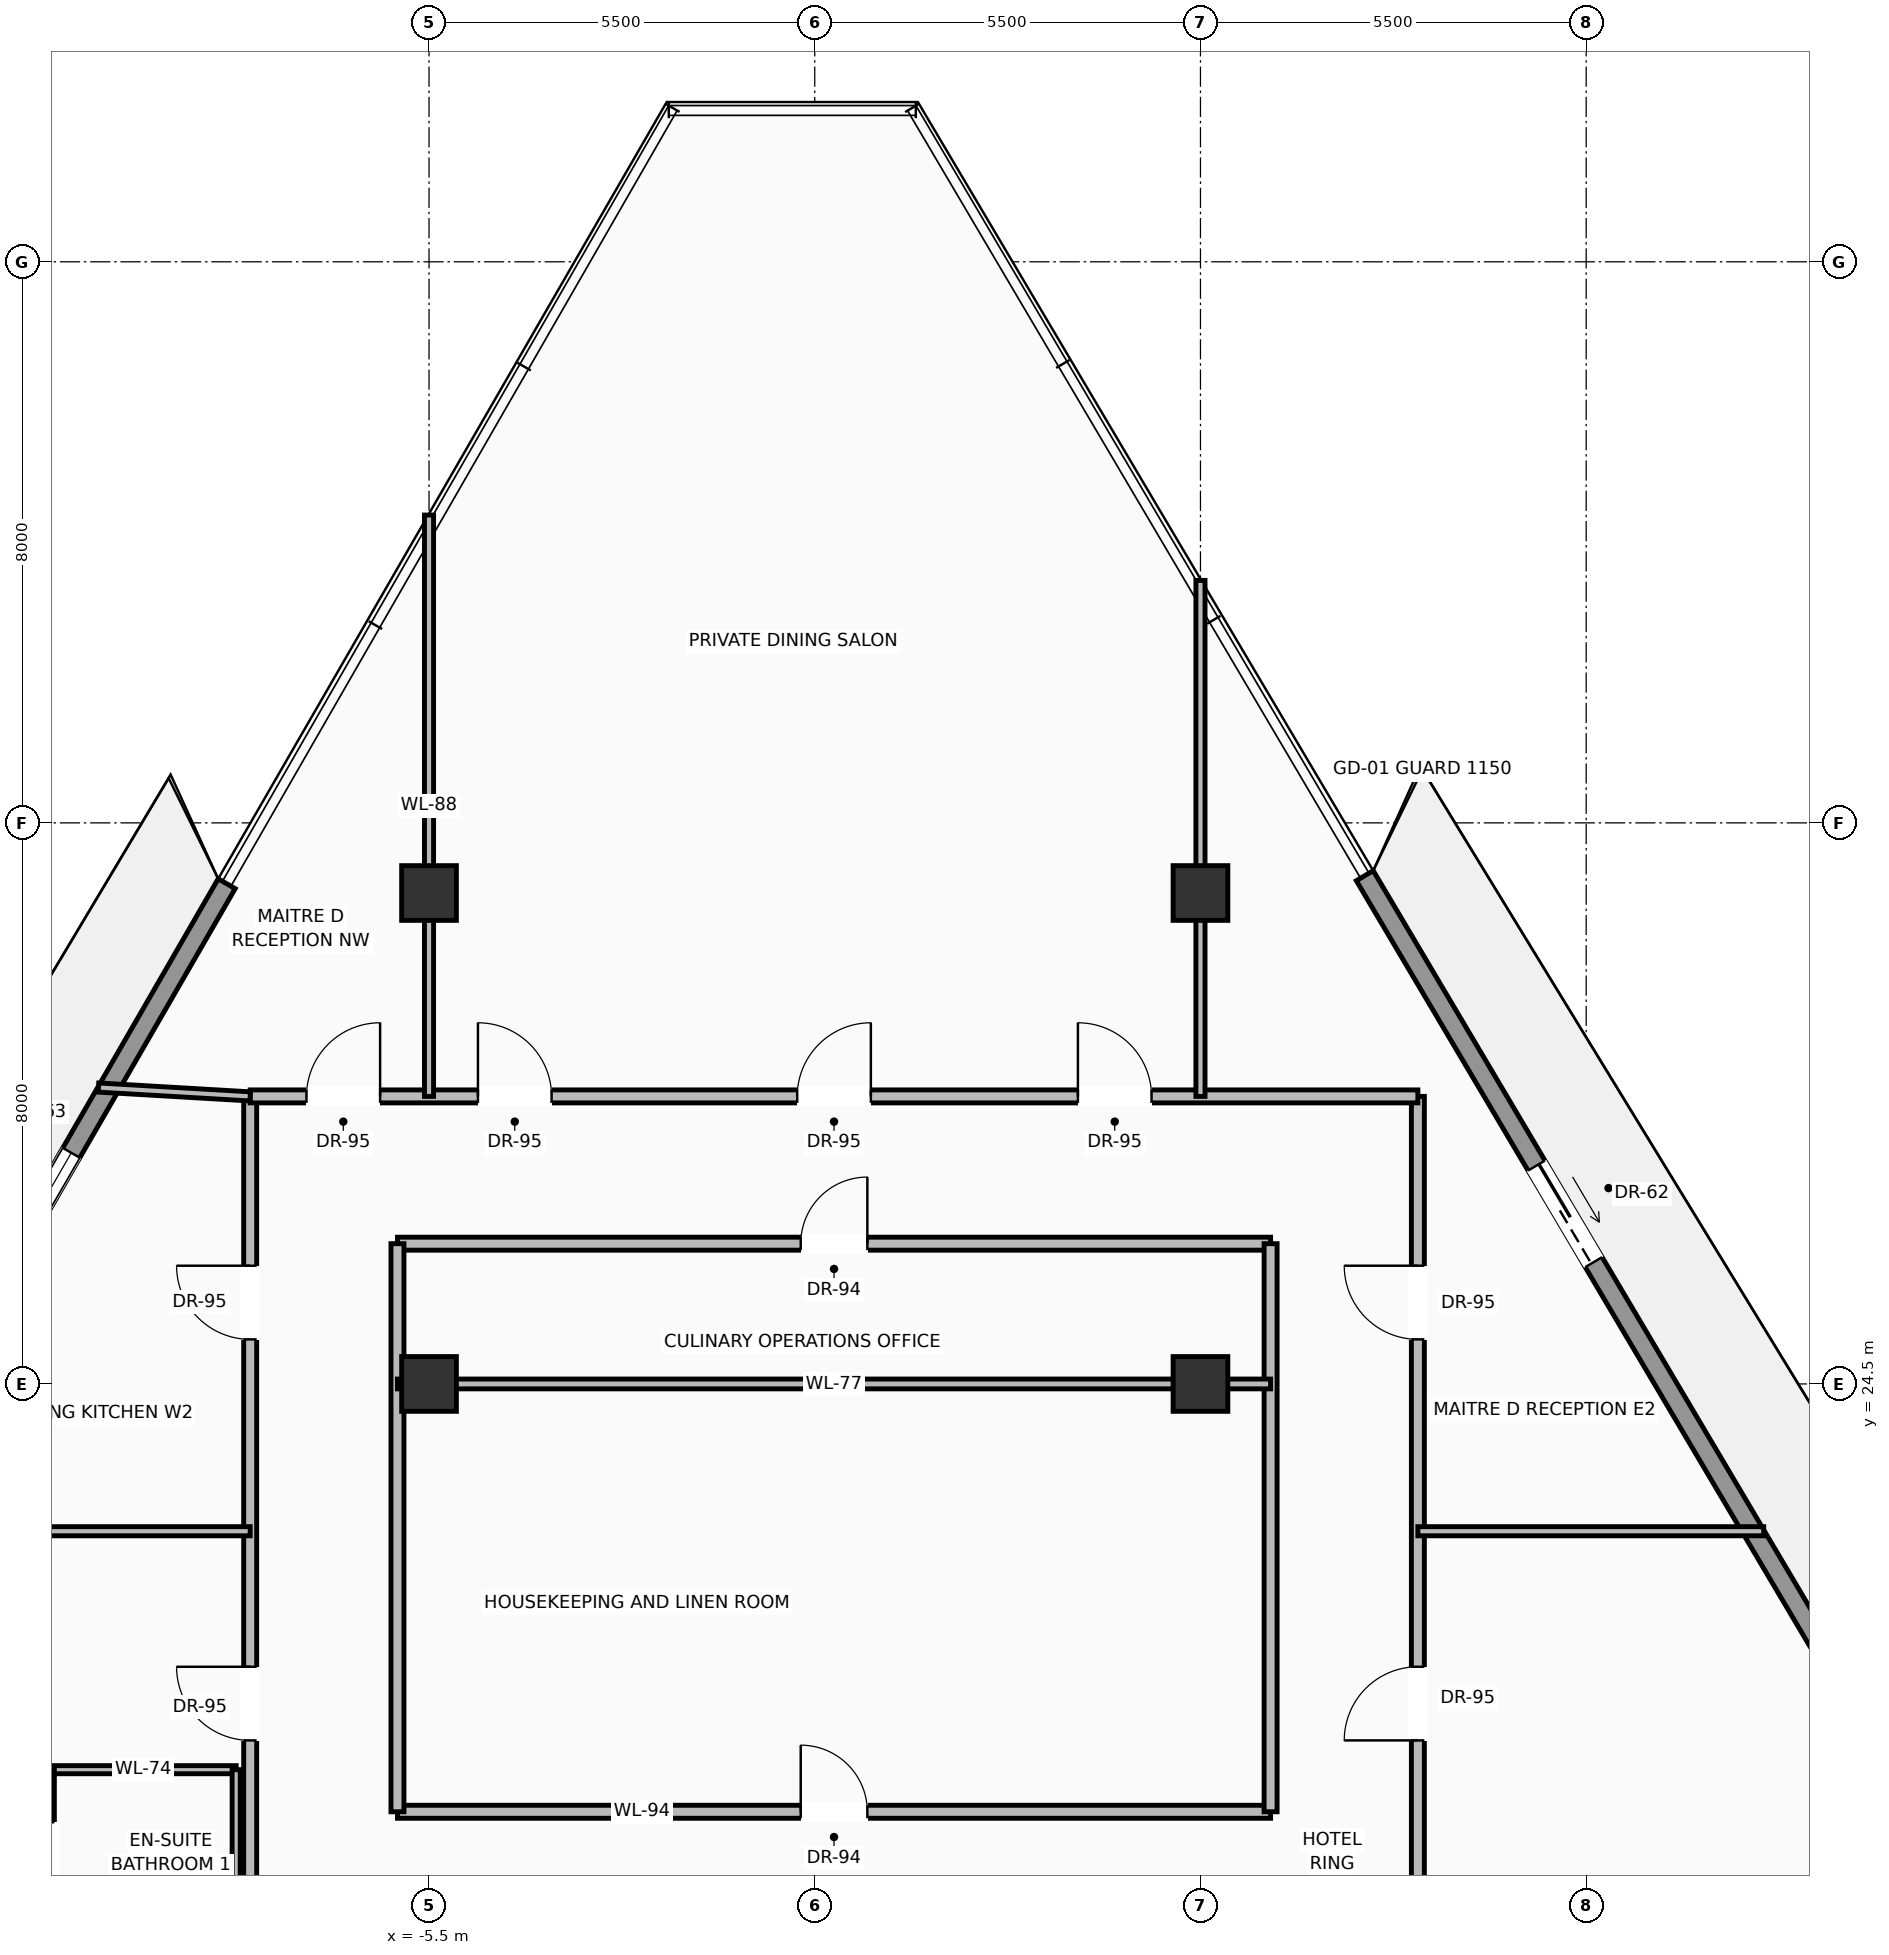
"""IFC4 building model, lengths in metres.
Left out: names, types, materials, properties, quantities, classifications, styles, units other than length and angle.
Written with IfcOpenShell. Run it as: python <this file> out.ifc"""

import sys

from ifc_helpers import new_model, si_unit, direction, frame, frame_2d, origin, origin_2d, place, context, subcontext, project, spatial, rectangle, extrude, source, transform, mapped, element, fill, save


model = new_model("IFC4")
c1 = context("Model", 3, precision=1e-05, world=origin(), true_north=direction((0.0, 1.0)))
c2 = subcontext(c1, "Body", "Model", "MODEL_VIEW")
j1 = project(units=[si_unit("LENGTHUNIT", "METRE"), si_unit("PLANEANGLEUNIT", "RADIAN")], contexts=[c1])
p1 = place(None, origin())
s1 = spatial("IfcSite", under=j1, at=p1, CompositionType="ELEMENT")
p2 = place(p1, origin())
s2 = spatial("IfcBuilding", under=s1, at=p2, CompositionType="ELEMENT")
p3 = place(p2, frame((0.0, 0.0, 276.45)))
s3 = spatial("IfcBuildingStorey", under=s2, at=p3, CompositionType="ELEMENT", Elevation=276.45)
m1 = source(origin(), c2, "Body", "SweptSolid", [
    extrude(rectangle(XDim=0.78, YDim=0.78, at=origin_2d()), origin(), (0.0, 0.0, 1.0), 3.45),
])
for number, where, z_axis, x_axis in (
    (1, (-5.5, 24.5, 0.0), (0.0, 0.0, 1.0), (1.0, 0.0, 0.0)),
    (2, (5.5, 24.5, 0.0), (0.0, 0.0, 1.0), (1.0, 0.0, 0.0)),
    (3, (-5.5, 31.5, 0.0), (0.0, 0.0, 1.0), (1.0, 0.0, 0.0)),
    (4, (5.5, 31.5, 0.0), (0.0, 0.0, 1.0), (1.0, 0.0, 0.0)),
):
    element("IfcColumn", number, at=place(p3, frame(where, z_axis=z_axis, x_axis=x_axis)), inside=s3, PredefinedType="COLUMN", context=c2, shape_type="MappedRepresentation", body=[
        mapped(m1, transform((0.0, 0.0, 0.0), scale=1.0)),
    ])
p4 = place(p3, frame((-18.435, 14.229, 0.0), z_axis=(0.0, 0.0, 1.0), x_axis=(0.50006385546, 0.865988533678, 0.0)))
e5 = element("IfcWall", 5, at=p4, inside=s3, PredefinedType="SOLIDWALL", context=c2, shape_type="SweptSolid", body=[
    extrude(rectangle(XDim=20.097, YDim=0.28, at=frame_2d((10.048, 0.0))), origin(), (0.0, 0.0, 1.0), 2.82),
])
p5 = place(p4, frame((4.823, 0.0, 0.0)))
e6 = element("IfcOpeningElement", 6, at=p5, cuts=e5, PredefinedType="OPENING", context=c2, shape_type="SweptSolid", body=[
    extrude(rectangle(XDim=1.6, YDim=2.35, at=frame_2d((0.8, 1.175))), frame((0.0, 0.15, 0.0), z_axis=(0.0, -1.0, 0.0), x_axis=(1.0, 0.0, 0.0)), (0.0, 0.0, 1.0), 0.3),
])
p6 = place(p4, frame((13.666, 0.0, 0.9)))
e7 = element("IfcOpeningElement", 7, at=p6, cuts=e5, PredefinedType="OPENING", context=c2, shape_type="SweptSolid", body=[
    extrude(rectangle(XDim=2.0, YDim=1.75, at=frame_2d((1.0, 0.875))), frame((0.0, 0.15, 0.0), z_axis=(0.0, -1.0, 0.0), x_axis=(1.0, 0.0, 0.0)), (0.0, 0.0, 1.0), 0.3),
])
p7 = place(p3, frame((7.843, 31.747, 0.0), z_axis=(0.0, 0.0, 1.0), x_axis=(0.50967367276, -0.860367797686, 0.0)))
e8 = element("IfcWall", 8, at=p7, inside=s3, PredefinedType="SOLIDWALL", context=c2, shape_type="SweptSolid", body=[
    extrude(rectangle(XDim=20.018, YDim=0.28, at=frame_2d((10.009, 0.0))), origin(), (0.0, 0.0, 1.0), 2.82),
])
p8 = place(p7, frame((4.804, 0.0, 0.0)))
e9 = element("IfcOpeningElement", 9, at=p8, cuts=e8, PredefinedType="OPENING", context=c2, shape_type="SweptSolid", body=[
    extrude(rectangle(XDim=1.6, YDim=2.35, at=frame_2d((0.8, 1.175))), frame((0.0, 0.15, 0.0), z_axis=(0.0, -1.0, 0.0), x_axis=(1.0, 0.0, 0.0)), (0.0, 0.0, 1.0), 0.3),
])
p9 = place(p7, frame((13.612, 0.0, 0.9)))
e10 = element("IfcOpeningElement", 10, at=p9, cuts=e8, PredefinedType="OPENING", context=c2, shape_type="SweptSolid", body=[
    extrude(rectangle(XDim=2.0, YDim=1.75, at=frame_2d((1.0, 0.875))), frame((0.0, 0.15, 0.0), z_axis=(0.0, -1.0, 0.0), x_axis=(1.0, 0.0, 0.0)), (0.0, 0.0, 1.0), 0.3),
])
p10 = place(p3, frame((-5.95, 18.4, 0.0), z_axis=(0.0, 0.0, 1.0), x_axis=(1.0, 0.0, 0.0)))
e11 = element("IfcWall", 11, at=p10, inside=s3, PredefinedType="PARTITIONING", context=c2, shape_type="SweptSolid", body=[
    extrude(rectangle(XDim=12.45, YDim=0.185, at=frame_2d((6.225, 0.0))), origin(), (0.0, 0.0, 1.0), 3.232),
])
p11 = place(p10, frame((5.75, 0.0, 0.0)))
e12 = element("IfcOpeningElement", 12, at=p11, cuts=e11, PredefinedType="OPENING", context=c2, shape_type="SweptSolid", body=[
    extrude(rectangle(XDim=0.95, YDim=2.2, at=frame_2d((0.475, 1.1))), frame((0.0, 0.103, 0.0), z_axis=(0.0, -1.0, 0.0), x_axis=(1.0, 0.0, 0.0)), (0.0, 0.0, 1.0), 0.205),
])
p12 = place(p3, frame((-5.95, 26.5, 0.0), z_axis=(0.0, 0.0, 1.0), x_axis=(1.0, 0.0, 0.0)))
e13 = element("IfcWall", 13, at=p12, inside=s3, PredefinedType="PARTITIONING", context=c2, shape_type="SweptSolid", body=[
    extrude(rectangle(XDim=12.45, YDim=0.185, at=frame_2d((6.225, 0.0))), origin(), (0.0, 0.0, 1.0), 3.232),
])
p13 = place(p12, frame((5.75, 0.0, 0.0)))
e14 = element("IfcOpeningElement", 14, at=p13, cuts=e13, PredefinedType="OPENING", context=c2, shape_type="SweptSolid", body=[
    extrude(rectangle(XDim=0.95, YDim=2.2, at=frame_2d((0.475, 1.1))), frame((0.0, 0.103, 0.0), z_axis=(0.0, -1.0, 0.0), x_axis=(1.0, 0.0, 0.0)), (0.0, 0.0, 1.0), 0.205),
])
for number, where, z_axis, x_axis in (
    (15, (-5.95, 18.4, 0.0), (0.0, 0.0, 1.0), (0.0, 1.0, 0.0)),
    (16, (6.5, 18.4, 0.0), (0.0, 0.0, 1.0), (0.0, 1.0, 0.0)),
):
    element("IfcWall", number, at=place(p3, frame(where, z_axis=z_axis, x_axis=x_axis)), inside=s3, PredefinedType="PARTITIONING", context=c2, shape_type="SweptSolid", body=[
        extrude(rectangle(XDim=8.1, YDim=0.185, at=frame_2d((4.05, 0.0))), origin(), (0.0, 0.0, 1.0), 3.232),
    ])
p14 = place(p3, frame((-8.05, 16.2, 0.0), z_axis=(0.0, 0.0, 1.0), x_axis=(0.0, 1.0, 0.0)))
e17 = element("IfcWall", 17, at=p14, inside=s3, PredefinedType="PARTITIONING", context=c2, shape_type="SweptSolid", body=[
    extrude(rectangle(XDim=12.4, YDim=0.185, at=frame_2d((6.2, 0.0))), origin(), (0.0, 0.0, 1.0), 3.232),
])
p15 = place(p14, frame((3.218, 0.0, 0.0)))
e18 = element("IfcOpeningElement", 18, at=p15, cuts=e17, PredefinedType="OPENING", context=c2, shape_type="SweptSolid", body=[
    extrude(rectangle(XDim=1.05, YDim=2.25, at=frame_2d((0.525, 1.125))), frame((0.0, 0.103, 0.0), z_axis=(0.0, -1.0, 0.0), x_axis=(1.0, 0.0, 0.0)), (0.0, 0.0, 1.0), 0.205),
])
p16 = place(p14, frame((8.936, 0.0, 0.0)))
e19 = element("IfcOpeningElement", 19, at=p16, cuts=e17, PredefinedType="OPENING", context=c2, shape_type="SweptSolid", body=[
    extrude(rectangle(XDim=1.05, YDim=2.25, at=frame_2d((0.525, 1.125))), frame((0.0, 0.103, 0.0), z_axis=(0.0, -1.0, 0.0), x_axis=(1.0, 0.0, 0.0)), (0.0, 0.0, 1.0), 0.205),
])
p17 = place(p3, frame((8.6, 16.2, 0.0), z_axis=(0.0, 0.0, 1.0), x_axis=(0.0, 1.0, 0.0)))
e20 = element("IfcWall", 20, at=p17, inside=s3, PredefinedType="PARTITIONING", context=c2, shape_type="SweptSolid", body=[
    extrude(rectangle(XDim=12.4, YDim=0.185, at=frame_2d((6.2, 0.0))), origin(), (0.0, 0.0, 1.0), 3.232),
])
p18 = place(p17, frame((3.218, 0.0, 0.0)))
e21 = element("IfcOpeningElement", 21, at=p18, cuts=e20, PredefinedType="OPENING", context=c2, shape_type="SweptSolid", body=[
    extrude(rectangle(XDim=1.05, YDim=2.25, at=frame_2d((0.525, 1.125))), frame((0.0, 0.103, 0.0), z_axis=(0.0, -1.0, 0.0), x_axis=(1.0, 0.0, 0.0)), (0.0, 0.0, 1.0), 0.205),
])
p19 = place(p17, frame((8.936, 0.0, 0.0)))
e22 = element("IfcOpeningElement", 22, at=p19, cuts=e20, PredefinedType="OPENING", context=c2, shape_type="SweptSolid", body=[
    extrude(rectangle(XDim=1.05, YDim=2.25, at=frame_2d((0.525, 1.125))), frame((0.0, 0.103, 0.0), z_axis=(0.0, -1.0, 0.0), x_axis=(1.0, 0.0, 0.0)), (0.0, 0.0, 1.0), 0.205),
])
p20 = place(p3, frame((-8.05, 28.6, 0.0), z_axis=(0.0, 0.0, 1.0), x_axis=(1.0, 0.0, 0.0)))
e23 = element("IfcWall", 23, at=p20, inside=s3, PredefinedType="PARTITIONING", context=c2, shape_type="SweptSolid", body=[
    extrude(rectangle(XDim=16.65, YDim=0.185, at=frame_2d((8.325, 0.0))), origin(), (0.0, 0.0, 1.0), 3.232),
])
p21 = place(p20, frame((3.248, 0.0, 0.0)))
e24 = element("IfcOpeningElement", 24, at=p21, cuts=e23, PredefinedType="OPENING", context=c2, shape_type="SweptSolid", body=[
    extrude(rectangle(XDim=1.05, YDim=2.25, at=frame_2d((0.525, 1.125))), frame((0.0, 0.103, 0.0), z_axis=(0.0, -1.0, 0.0), x_axis=(1.0, 0.0, 0.0)), (0.0, 0.0, 1.0), 0.205),
])
p22 = place(p20, frame((7.8, 0.0, 0.0)))
e25 = element("IfcOpeningElement", 25, at=p22, cuts=e23, PredefinedType="OPENING", context=c2, shape_type="SweptSolid", body=[
    extrude(rectangle(XDim=1.05, YDim=2.25, at=frame_2d((0.525, 1.125))), frame((0.0, 0.103, 0.0), z_axis=(0.0, -1.0, 0.0), x_axis=(1.0, 0.0, 0.0)), (0.0, 0.0, 1.0), 0.205),
])
p23 = place(p20, frame((11.802, 0.0, 0.0)))
e26 = element("IfcOpeningElement", 26, at=p23, cuts=e23, PredefinedType="OPENING", context=c2, shape_type="SweptSolid", body=[
    extrude(rectangle(XDim=1.05, YDim=2.25, at=frame_2d((0.525, 1.125))), frame((0.0, 0.103, 0.0), z_axis=(0.0, -1.0, 0.0), x_axis=(1.0, 0.0, 0.0)), (0.0, 0.0, 1.0), 0.205),
])
p24 = place(p20, frame((0.802, 0.0, 0.0)))
e27 = element("IfcOpeningElement", 27, at=p24, cuts=e23, PredefinedType="OPENING", context=c2, shape_type="SweptSolid", body=[
    extrude(rectangle(XDim=1.05, YDim=2.25, at=frame_2d((0.525, 1.125))), frame((0.0, 0.103, 0.0), z_axis=(0.0, -1.0, 0.0), x_axis=(1.0, 0.0, 0.0)), (0.0, 0.0, 1.0), 0.205),
])
p25 = place(p3, frame((-5.95, 24.5, 0.0), z_axis=(0.0, 0.0, 1.0), x_axis=(1.0, 0.0, 0.0)))
e28 = element("IfcWall", 28, at=p25, inside=s3, PredefinedType="PARTITIONING", context=c2, shape_type="SweptSolid", body=[
    extrude(rectangle(XDim=12.45, YDim=0.14, at=frame_2d((6.225, 0.0))), origin(), (0.0, 0.0, 1.0), 2.683),
])
p26 = place(p3, frame((-10.213, 28.726, 0.0), z_axis=(0.0, 0.0, 1.0), x_axis=(0.998302231297, -0.058246501928, 0.0)))
e29 = element("IfcWall", 29, at=p26, inside=s3, PredefinedType="PARTITIONING", context=c2, shape_type="SweptSolid", body=[
    extrude(rectangle(XDim=2.167, YDim=0.13, at=frame_2d((1.083, 0.0))), origin(), (0.0, 0.0, 1.0), 3.232),
])
p27 = place(p3, frame((-5.5, 28.6, 0.0), z_axis=(0.0, 0.0, 1.0), x_axis=(0.0, 1.0, 0.0)))
e30 = element("IfcWall", 30, at=p27, inside=s3, PredefinedType="PARTITIONING", context=c2, shape_type="SweptSolid", body=[
    extrude(rectangle(XDim=8.289, YDim=0.13, at=frame_2d((4.145, 0.0))), origin(), (0.0, 0.0, 1.0), 2.683),
])
p28 = place(p3, frame((5.5, 28.6, 0.0), z_axis=(0.0, 0.0, 1.0), x_axis=(0.0, 1.0, 0.0)))
e31 = element("IfcWall", 31, at=p28, inside=s3, PredefinedType="PARTITIONING", context=c2, shape_type="SweptSolid", body=[
    extrude(rectangle(XDim=7.357, YDim=0.13, at=frame_2d((3.679, 0.0))), origin(), (0.0, 0.0, 1.0), 2.683),
])
p29 = place(p3, frame((-10.9, 19.0, 0.0), z_axis=(0.0, 0.0, 1.0), x_axis=(1.0, 0.0, 0.0)))
e32 = element("IfcWall", 32, at=p29, inside=s3, PredefinedType="PARTITIONING", context=c2, shape_type="SweptSolid", body=[
    extrude(rectangle(XDim=2.65, YDim=0.115, at=frame_2d((1.325, 0.0))), origin(), (0.0, 0.0, 1.0), 3.232),
])
p30 = place(p3, frame((-10.9, 16.6, 0.0), z_axis=(0.0, 0.0, 1.0), x_axis=(0.0, 1.0, 0.0)))
e33 = element("IfcWall", 33, at=p30, inside=s3, PredefinedType="PARTITIONING", context=c2, shape_type="SweptSolid", body=[
    extrude(rectangle(XDim=2.4, YDim=0.115, at=frame_2d((1.2, 0.0))), origin(), (0.0, 0.0, 1.0), 3.232),
])
p31 = place(p30, frame((0.75, 0.0, 0.0)))
e34 = element("IfcOpeningElement", 34, at=p31, cuts=e33, PredefinedType="OPENING", context=c2, shape_type="SweptSolid", body=[
    extrude(rectangle(XDim=0.9, YDim=2.15, at=frame_2d((0.45, 1.075))), frame((0.0, 0.067, 0.0), z_axis=(0.0, -1.0, 0.0), x_axis=(1.0, 0.0, 0.0)), (0.0, 0.0, 1.0), 0.135),
])
p32 = place(p3, frame((-8.25, 16.6, 0.0), z_axis=(0.0, 0.0, 1.0), x_axis=(0.0, 1.0, 0.0)))
e35 = element("IfcWall", 35, at=p32, inside=s3, PredefinedType="PARTITIONING", context=c2, shape_type="SweptSolid", body=[
    extrude(rectangle(XDim=2.4, YDim=0.115, at=frame_2d((1.2, 0.0))), origin(), (0.0, 0.0, 1.0), 3.232),
])
p33 = place(p3, frame((-13.866, 22.4, 0.0), z_axis=(0.0, 0.0, 1.0), x_axis=(1.0, 0.0, 0.0)))
e36 = element("IfcWall", 36, at=p33, inside=s3, PredefinedType="PARTITIONING", context=c2, shape_type="SweptSolid", body=[
    extrude(rectangle(XDim=5.816, YDim=0.13, at=frame_2d((2.908, 0.0))), origin(), (0.0, 0.0, 1.0), 3.232),
])
p34 = place(p3, frame((8.6, 22.4, 0.0), z_axis=(0.0, 0.0, 1.0), x_axis=(1.0, 0.0, 0.0)))
e37 = element("IfcWall", 37, at=p34, inside=s3, PredefinedType="PARTITIONING", context=c2, shape_type="SweptSolid", body=[
    extrude(rectangle(XDim=4.931, YDim=0.13, at=frame_2d((2.466, 0.0))), origin(), (0.0, 0.0, 1.0), 3.232),
])
m2 = source(origin(), c2, "Body", "SweptSolid", [
    extrude(rectangle(XDim=2.0, YDim=1.75, at=frame_2d((1.0, 0.875))), frame((0.0, 0.03, 0.0), z_axis=(0.0, -1.0, 0.0), x_axis=(1.0, 0.0, 0.0)), (0.0, 0.0, 1.0), 0.06),
])
p35 = place(p6, origin())
e38 = element("IfcWindow", 38, at=p35, inside=s3, PartitioningType="SINGLE_PANEL", PredefinedType="WINDOW", context=c2, shape_type="MappedRepresentation", body=[
    mapped(m2, transform((0.0, 0.0, 0.0), scale=1.0)),
])
fill(e7, e38)
m3 = source(origin(), c2, "Body", "SweptSolid", [
    extrude(rectangle(XDim=1.6, YDim=2.35, at=frame_2d((0.8, 1.175))), frame((0.0, 0.025, 0.0), z_axis=(0.0, -1.0, 0.0), x_axis=(1.0, 0.0, 0.0)), (0.0, 0.0, 1.0), 0.05),
])
p36 = place(p8, origin())
e39 = element("IfcDoor", 39, at=p36, inside=s3, OperationType="SLIDING_TO_RIGHT", PredefinedType="DOOR", context=c2, shape_type="MappedRepresentation", body=[
    mapped(m3, transform((0.0, 0.0, 0.0), scale=1.0)),
])
fill(e9, e39)
m4 = source(origin(), c2, "Body", "SweptSolid", [
    extrude(rectangle(XDim=0.95, YDim=2.2, at=frame_2d((0.475, 1.1))), frame((0.0, 0.025, 0.0), z_axis=(0.0, -1.0, 0.0), x_axis=(1.0, 0.0, 0.0)), (0.0, 0.0, 1.0), 0.05),
])
p37 = place(p11, origin())
e40 = element("IfcDoor", 40, at=p37, inside=s3, OperationType="SINGLE_SWING_LEFT", PredefinedType="DOOR", context=c2, shape_type="MappedRepresentation", body=[
    mapped(m4, transform((0.0, 0.0, 0.0), scale=1.0)),
])
fill(e12, e40)
p38 = place(p13, origin())
e41 = element("IfcDoor", 41, at=p38, inside=s3, OperationType="SINGLE_SWING_RIGHT", PredefinedType="DOOR", context=c2, shape_type="MappedRepresentation", body=[
    mapped(m4, transform((0.0, 0.0, 0.0), scale=1.0)),
])
fill(e14, e41)
m5 = source(origin(), c2, "Body", "SweptSolid", [
    extrude(rectangle(XDim=1.05, YDim=2.25, at=frame_2d((0.525, 1.125))), frame((0.0, 0.025, 0.0), z_axis=(0.0, -1.0, 0.0), x_axis=(1.0, 0.0, 0.0)), (0.0, 0.0, 1.0), 0.05),
])
p39 = place(p15, origin())
e42 = element("IfcDoor", 42, at=p39, inside=s3, OperationType="SINGLE_SWING_RIGHT", PredefinedType="DOOR", context=c2, shape_type="MappedRepresentation", body=[
    mapped(m5, transform((0.0, 0.0, 0.0), scale=1.0)),
])
fill(e18, e42)
p40 = place(p16, origin())
e43 = element("IfcDoor", 43, at=p40, inside=s3, OperationType="SINGLE_SWING_RIGHT", PredefinedType="DOOR", context=c2, shape_type="MappedRepresentation", body=[
    mapped(m5, transform((0.0, 0.0, 0.0), scale=1.0)),
])
fill(e19, e43)
p41 = place(p18, origin())
e44 = element("IfcDoor", 44, at=p41, inside=s3, OperationType="SINGLE_SWING_LEFT", PredefinedType="DOOR", context=c2, shape_type="MappedRepresentation", body=[
    mapped(m5, transform((0.0, 0.0, 0.0), scale=1.0)),
])
fill(e21, e44)
p42 = place(p19, origin())
e45 = element("IfcDoor", 45, at=p42, inside=s3, OperationType="SINGLE_SWING_RIGHT", PredefinedType="DOOR", context=c2, shape_type="MappedRepresentation", body=[
    mapped(m5, transform((0.0, 0.0, 0.0), scale=1.0)),
])
fill(e22, e45)
p43 = place(p21, origin())
e46 = element("IfcDoor", 46, at=p43, inside=s3, OperationType="SINGLE_SWING_LEFT", PredefinedType="DOOR", context=c2, shape_type="MappedRepresentation", body=[
    mapped(m5, transform((0.0, 0.0, 0.0), scale=1.0)),
])
fill(e24, e46)
p44 = place(p22, origin())
e47 = element("IfcDoor", 47, at=p44, inside=s3, OperationType="SINGLE_SWING_RIGHT", PredefinedType="DOOR", context=c2, shape_type="MappedRepresentation", body=[
    mapped(m5, transform((0.0, 0.0, 0.0), scale=1.0)),
])
fill(e25, e47)
p45 = place(p23, origin())
e48 = element("IfcDoor", 48, at=p45, inside=s3, OperationType="SINGLE_SWING_LEFT", PredefinedType="DOOR", context=c2, shape_type="MappedRepresentation", body=[
    mapped(m5, transform((0.0, 0.0, 0.0), scale=1.0)),
])
fill(e26, e48)
p46 = place(p24, origin())
e49 = element("IfcDoor", 49, at=p46, inside=s3, OperationType="SINGLE_SWING_RIGHT", PredefinedType="DOOR", context=c2, shape_type="MappedRepresentation", body=[
    mapped(m5, transform((0.0, 0.0, 0.0), scale=1.0)),
])
fill(e27, e49)
save(model, sys.argv[1])
